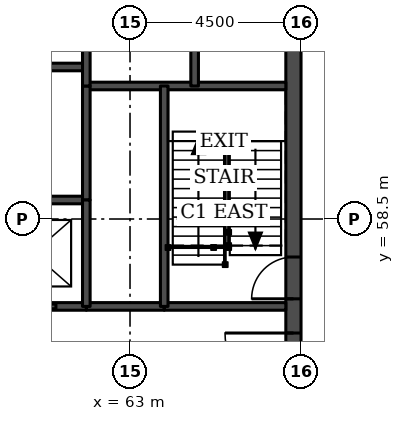
"""IFC4 building model, lengths in metres.
Left out: names, types, materials, properties, quantities, classifications, styles, units other than length and angle.
Written with IfcOpenShell. Run it as: python <this file> out.ifc"""

import sys

from ifc_helpers import new_model, si_unit, direction, frame, frame_2d, origin, place, context, subcontext, project, spatial, rectangle, extrude, element, fill, save


model = new_model("IFC4")
c1 = context("Model", 3, precision=1e-05, world=origin(), true_north=direction((0.0, 1.0)))
c2 = subcontext(c1, "Body", "Model", "MODEL_VIEW")
j1 = project(units=[si_unit("LENGTHUNIT", "METRE"), si_unit("PLANEANGLEUNIT", "RADIAN")], contexts=[c1])
p1 = place(None, origin())
s1 = spatial("IfcSite", under=j1, at=p1, CompositionType="ELEMENT")
p2 = place(p1, origin())
s2 = spatial("IfcBuilding", under=s1, at=p2, CompositionType="ELEMENT")
p3 = place(p2, frame((0.0, 0.0, 147.7)))
s3 = spatial("IfcBuildingStorey", under=s2, at=p3, CompositionType="ELEMENT", Elevation=147.7)
p4 = place(p3, frame((67.3, 49.5, 0.0), z_axis=(0.0, 0.0, 1.0), x_axis=(0.0, 1.0, 0.0)))
e1 = element("IfcWall", 1, at=p4, inside=s3, PredefinedType="SHEAR", context=c2, shape_type="SweptSolid", body=[
    extrude(rectangle(XDim=22.5, YDim=0.4, at=frame_2d((11.25, 0.0))), origin(), (0.0, 0.0, 1.0), 3.7),
])
p5 = place(p4, frame((4.2, 0.0, 0.0)))
e2 = element("IfcOpeningElement", 2, at=p5, cuts=e1, PredefinedType="OPENING", context=c2, shape_type="SweptSolid", body=[
    extrude(rectangle(XDim=1.8, YDim=2.1, at=frame_2d((0.9, 1.05))), frame((0.0, 0.21, 0.0), z_axis=(0.0, -1.0, 0.0), x_axis=(1.0, 0.0, 0.0)), (0.0, 0.0, 1.0), 0.42),
])
p6 = place(p4, frame((6.9, 0.0, 0.0)))
e3 = element("IfcOpeningElement", 3, at=p6, cuts=e1, PredefinedType="OPENING", context=c2, shape_type="SweptSolid", body=[
    extrude(rectangle(XDim=1.1, YDim=2.1, at=frame_2d((0.55, 1.05))), frame((0.0, 0.21, 0.0), z_axis=(0.0, -1.0, 0.0), x_axis=(1.0, 0.0, 0.0)), (0.0, 0.0, 1.0), 0.42),
])
p7 = place(p4, frame((13.6, 0.0, 0.0)))
e4 = element("IfcOpeningElement", 4, at=p7, cuts=e1, PredefinedType="OPENING", context=c2, shape_type="SweptSolid", body=[
    extrude(rectangle(XDim=1.1, YDim=2.1, at=frame_2d((0.55, 1.05))), frame((0.0, 0.21, 0.0), z_axis=(0.0, -1.0, 0.0), x_axis=(1.0, 0.0, 0.0)), (0.0, 0.0, 1.0), 0.42),
])
p8 = place(p4, frame((16.5, 0.0, 0.0)))
e5 = element("IfcOpeningElement", 5, at=p8, cuts=e1, PredefinedType="OPENING", context=c2, shape_type="SweptSolid", body=[
    extrude(rectangle(XDim=1.8, YDim=2.1, at=frame_2d((0.9, 1.05))), frame((0.0, 0.21, 0.0), z_axis=(0.0, -1.0, 0.0), x_axis=(1.0, 0.0, 0.0)), (0.0, 0.0, 1.0), 0.42),
])
p9 = place(p3, frame((61.85, 56.2, 0.0), z_axis=(0.0, 0.0, 1.0), x_axis=(1.0, 0.0, 0.0)))
e6 = element("IfcWall", 6, at=p9, inside=s3, PredefinedType="SOLIDWALL", context=c2, shape_type="SweptSolid", body=[
    extrude(rectangle(XDim=2.05, YDim=0.2, at=frame_2d((1.025, 0.0))), origin(), (0.0, 0.0, 1.0), 3.55),
])
p10 = place(p3, frame((50.65, 56.2, 0.0), z_axis=(0.0, 0.0, 1.0), x_axis=(1.0, 0.0, 0.0)))
e7 = element("IfcWall", 7, at=p10, inside=s3, PredefinedType="SOLIDWALL", context=c2, shape_type="SweptSolid", body=[
    extrude(rectangle(XDim=11.2, YDim=0.2, at=frame_2d((5.6, 0.0))), origin(), (0.0, 0.0, 1.0), 3.55),
])
p11 = place(p10, frame((0.8, 0.0, 0.0)))
e8 = element("IfcOpeningElement", 8, at=p11, cuts=e7, PredefinedType="OPENING", context=c2, shape_type="SweptSolid", body=[
    extrude(rectangle(XDim=1.2, YDim=2.1, at=frame_2d((0.6, 1.05))), frame((0.0, 0.11, 0.0), z_axis=(0.0, -1.0, 0.0), x_axis=(1.0, 0.0, 0.0)), (0.0, 0.0, 1.0), 0.22),
])
p12 = place(p10, frame((3.6, 0.0, 0.0)))
e9 = element("IfcOpeningElement", 9, at=p12, cuts=e7, PredefinedType="OPENING", context=c2, shape_type="SweptSolid", body=[
    extrude(rectangle(XDim=1.2, YDim=2.1, at=frame_2d((0.6, 1.05))), frame((0.0, 0.11, 0.0), z_axis=(0.0, -1.0, 0.0), x_axis=(1.0, 0.0, 0.0)), (0.0, 0.0, 1.0), 0.22),
])
p13 = place(p10, frame((6.4, 0.0, 0.0)))
e10 = element("IfcOpeningElement", 10, at=p13, cuts=e7, PredefinedType="OPENING", context=c2, shape_type="SweptSolid", body=[
    extrude(rectangle(XDim=1.2, YDim=2.1, at=frame_2d((0.6, 1.05))), frame((0.0, 0.11, 0.0), z_axis=(0.0, -1.0, 0.0), x_axis=(1.0, 0.0, 0.0)), (0.0, 0.0, 1.0), 0.22),
])
p14 = place(p10, frame((9.2, 0.0, 0.0)))
e11 = element("IfcOpeningElement", 11, at=p14, cuts=e7, PredefinedType="OPENING", context=c2, shape_type="SweptSolid", body=[
    extrude(rectangle(XDim=1.2, YDim=2.1, at=frame_2d((0.6, 1.05))), frame((0.0, 0.11, 0.0), z_axis=(0.0, -1.0, 0.0), x_axis=(1.0, 0.0, 0.0)), (0.0, 0.0, 1.0), 0.22),
])
p15 = place(p3, frame((63.9, 56.2, 0.0), z_axis=(0.0, 0.0, 1.0), x_axis=(1.0, 0.0, 0.0)))
e12 = element("IfcWall", 12, at=p15, inside=s3, PredefinedType="SOLIDWALL", context=c2, shape_type="SweptSolid", body=[
    extrude(rectangle(XDim=3.2, YDim=0.2, at=frame_2d((1.6, 0.0))), origin(), (0.0, 0.0, 1.0), 3.55),
])
p16 = place(p3, frame((50.65, 59.0, 0.0), z_axis=(0.0, 0.0, 1.0), x_axis=(1.0, 0.0, 0.0)))
e13 = element("IfcWall", 13, at=p16, inside=s3, PredefinedType="SOLIDWALL", context=c2, shape_type="SweptSolid", body=[
    extrude(rectangle(XDim=11.2, YDim=0.2, at=frame_2d((5.6, 0.0))), origin(), (0.0, 0.0, 1.0), 3.7),
])
p17 = place(p3, frame((61.85, 62.0, 0.0), z_axis=(0.0, 0.0, 1.0), x_axis=(1.0, 0.0, 0.0)))
e14 = element("IfcWall", 14, at=p17, inside=s3, PredefinedType="SOLIDWALL", context=c2, shape_type="SweptSolid", body=[
    extrude(rectangle(XDim=5.25, YDim=0.2, at=frame_2d((2.625, 0.0))), origin(), (0.0, 0.0, 1.0), 3.55),
])
p18 = place(p3, frame((50.65, 62.5, 0.0), z_axis=(0.0, 0.0, 1.0), x_axis=(1.0, 0.0, 0.0)))
e15 = element("IfcWall", 15, at=p18, inside=s3, PredefinedType="SOLIDWALL", context=c2, shape_type="SweptSolid", body=[
    extrude(rectangle(XDim=11.2, YDim=0.2, at=frame_2d((5.6, 0.0))), origin(), (0.0, 0.0, 1.0), 3.7),
])
p19 = place(p3, frame((61.85, 59.0, 0.0), z_axis=(0.0, 0.0, 1.0), x_axis=(0.0, 1.0, 0.0)))
e16 = element("IfcWall", 16, at=p19, inside=s3, PredefinedType="SOLIDWALL", context=c2, shape_type="SweptSolid", body=[
    extrude(rectangle(XDim=3.0, YDim=0.2, at=frame_2d((1.5, 0.0))), origin(), (0.0, 0.0, 1.0), 3.7),
])
p20 = place(p3, frame((61.85, 56.2, 0.0), z_axis=(0.0, 0.0, 1.0), x_axis=(0.0, 1.0, 0.0)))
e17 = element("IfcWall", 17, at=p20, inside=s3, PredefinedType="SOLIDWALL", context=c2, shape_type="SweptSolid", body=[
    extrude(rectangle(XDim=2.8, YDim=0.2, at=frame_2d((1.4, 0.0))), origin(), (0.0, 0.0, 1.0), 3.55),
])
p21 = place(p3, frame((61.85, 62.0, 0.0), z_axis=(0.0, 0.0, 1.0), x_axis=(0.0, 1.0, 0.0)))
e18 = element("IfcWall", 18, at=p21, inside=s3, PredefinedType="SOLIDWALL", context=c2, shape_type="SweptSolid", body=[
    extrude(rectangle(XDim=3.3, YDim=0.2, at=frame_2d((1.65, 0.0))), origin(), (0.0, 0.0, 1.0), 3.55),
])
p22 = place(p3, frame((63.9, 56.2, 0.0), z_axis=(0.0, 0.0, 1.0), x_axis=(0.0, 1.0, 0.0)))
e19 = element("IfcWall", 19, at=p22, inside=s3, PredefinedType="SOLIDWALL", context=c2, shape_type="SweptSolid", body=[
    extrude(rectangle(XDim=5.8, YDim=0.2, at=frame_2d((2.9, 0.0))), origin(), (0.0, 0.0, 1.0), 3.55),
])
p23 = place(p3, frame((64.7, 62.0, 0.0), z_axis=(0.0, 0.0, 1.0), x_axis=(0.0, 1.0, 0.0)))
e20 = element("IfcWall", 20, at=p23, inside=s3, PredefinedType="SOLIDWALL", context=c2, shape_type="SweptSolid", body=[
    extrude(rectangle(XDim=3.3, YDim=0.2, at=frame_2d((1.65, 0.0))), origin(), (0.0, 0.0, 1.0), 3.55),
])
p24 = place(p23, frame((1.1, 0.0, 0.0)))
e21 = element("IfcOpeningElement", 21, at=p24, cuts=e20, PredefinedType="OPENING", context=c2, shape_type="SweptSolid", body=[
    extrude(rectangle(XDim=1.1, YDim=2.1, at=frame_2d((0.55, 1.05))), frame((0.0, 0.11, 0.0), z_axis=(0.0, -1.0, 0.0), x_axis=(1.0, 0.0, 0.0)), (0.0, 0.0, 1.0), 0.22),
])
p25 = place(p14, origin())
e22 = element("IfcDoor", 22, at=p25, inside=s3, OperationType="DOUBLE_DOOR_SLIDING", PredefinedType="DOOR", context=c2, shape_type="SweptSolid", body=[
    extrude(rectangle(XDim=1.2, YDim=2.1, at=frame_2d((0.6, 1.05))), frame((0.0, 0.025, 0.0), z_axis=(0.0, -1.0, 0.0), x_axis=(1.0, 0.0, 0.0)), (0.0, 0.0, 1.0), 0.05),
])
fill(e11, e22)
p26 = place(p5, origin())
e23 = element("IfcDoor", 23, at=p26, inside=s3, OperationType="SINGLE_SWING_RIGHT", PredefinedType="DOOR", context=c2, shape_type="SweptSolid", body=[
    extrude(rectangle(XDim=1.8, YDim=2.1, at=frame_2d((0.9, 1.05))), frame((0.0, 0.025, 0.0), z_axis=(0.0, -1.0, 0.0), x_axis=(1.0, 0.0, 0.0)), (0.0, 0.0, 1.0), 0.05),
])
fill(e2, e23)
p27 = place(p6, origin())
e24 = element("IfcDoor", 24, at=p27, inside=s3, OperationType="SINGLE_SWING_LEFT", PredefinedType="DOOR", context=c2, shape_type="SweptSolid", body=[
    extrude(rectangle(XDim=1.1, YDim=2.1, at=frame_2d((0.55, 1.05))), frame((0.0, 0.025, 0.0), z_axis=(0.0, -1.0, 0.0), x_axis=(1.0, 0.0, 0.0)), (0.0, 0.0, 1.0), 0.05),
])
fill(e3, e24)
save(model, sys.argv[1])
